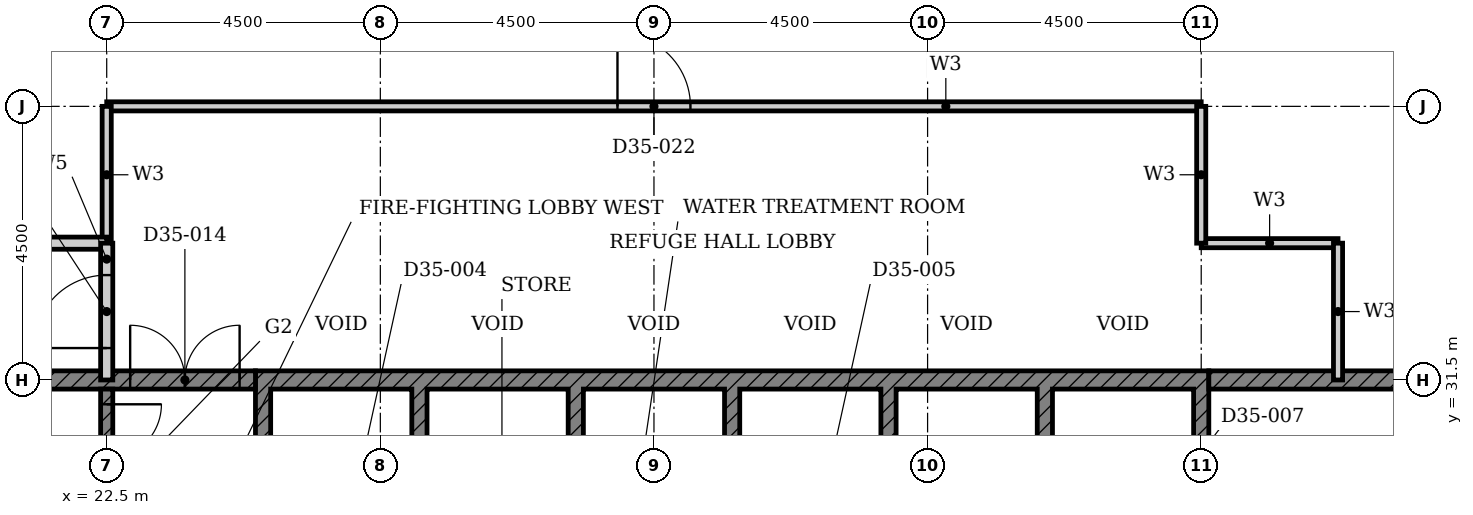
"""IFC4 building model, lengths in metres.
Left out: names, types, materials, properties, quantities, classifications, styles, units other than length and angle.
Written with IfcOpenShell. Run it as: python <this file> out.ifc"""

import sys

from ifc_helpers import new_model, si_unit, direction, frame, frame_2d, origin, place, context, subcontext, project, spatial, polyline, rectangle, outline, extrude, element, fill, save


model = new_model("IFC4")
c1 = context("Model", 3, precision=1e-05, world=origin(), true_north=direction((0.0, 1.0)))
c2 = subcontext(c1, "Body", "Model", "MODEL_VIEW")
j1 = project(units=[si_unit("LENGTHUNIT", "METRE"), si_unit("PLANEANGLEUNIT", "RADIAN")], contexts=[c1])
p1 = place(None, origin())
s1 = spatial("IfcSite", under=j1, at=p1, CompositionType="ELEMENT")
p2 = place(p1, origin())
s2 = spatial("IfcBuilding", under=s1, at=p2, CompositionType="ELEMENT")
p3 = place(p2, frame((0.0, 0.0, 140.4)))
s3 = spatial("IfcBuildingStorey", under=s2, at=p3, CompositionType="ELEMENT", Elevation=140.4)
p4 = place(p3, origin())
e1 = element("IfcWall", 1, at=p4, inside=s3, PredefinedType="SHEAR", context=c2, shape_type="SweptSolid", body=[
    extrude(outline(polyline([(24.947, 28.725), (25.197, 28.725), (25.197, 31.35), (27.518, 31.35), (27.518, 28.725), (27.768, 28.725), (27.768, 31.35), (30.089, 31.35), (30.089, 28.725), (30.339, 28.725), (30.339, 31.35), (32.661, 31.35), (32.661, 28.725), (32.911, 28.725), (32.911, 31.35), (35.232, 31.35), (35.232, 28.725), (35.482, 28.725), (35.482, 31.35), (37.803, 31.35), (37.803, 28.725), (38.053, 28.725), (38.053, 31.35), (40.375, 31.35), (40.375, 28.725), (40.625, 28.725), (40.625, 31.65), (24.947, 31.65), (24.947, 28.725)])), origin(), (0.0, 0.0, 1.0), 4.45),
])
p5 = place(p3, frame((18.15, 31.5, 0.0), z_axis=(0.0, 0.0, 1.0), x_axis=(1.0, 0.0, 0.0)))
e2 = element("IfcWall", 2, at=p5, inside=s3, PredefinedType="SHEAR", context=c2, shape_type="SweptSolid", body=[
    extrude(rectangle(XDim=6.797, YDim=0.3, at=frame_2d((3.398, 0.0))), origin(), (0.0, 0.0, 1.0), 4.45),
])
p6 = place(p5, frame((4.736, 0.0, 0.0)))
e3 = element("IfcOpeningElement", 3, at=p6, cuts=e2, PredefinedType="OPENING", context=c2, shape_type="SweptSolid", body=[
    extrude(rectangle(XDim=1.8, YDim=2.1, at=frame_2d((0.9, 1.05))), frame((0.0, 0.16, 0.0), z_axis=(0.0, -1.0, 0.0), x_axis=(1.0, 0.0, 0.0)), (0.0, 0.0, 1.0), 0.32),
])
p7 = place(p3, frame((40.625, 31.5, 0.0), z_axis=(0.0, 0.0, 1.0), x_axis=(1.0, 0.0, 0.0)))
e4 = element("IfcWall", 4, at=p7, inside=s3, PredefinedType="SHEAR", context=c2, shape_type="SweptSolid", body=[
    extrude(rectangle(XDim=4.225, YDim=0.3, at=frame_2d((2.113, 0.0))), origin(), (0.0, 0.0, 1.0), 4.45),
])
p8 = place(p3, frame((22.5, 31.35, 0.0), z_axis=(0.0, 0.0, 1.0), x_axis=(0.0, -1.0, 0.0)))
e5 = element("IfcWall", 5, at=p8, inside=s3, PredefinedType="SHEAR", context=c2, shape_type="SweptSolid", body=[
    extrude(rectangle(XDim=5.825, YDim=0.2, at=frame_2d((2.913, 0.0))), origin(), (0.0, 0.0, 1.0), 4.45),
])
p9 = place(p8, frame((0.25, 0.0, 0.0)))
e6 = element("IfcOpeningElement", 6, at=p9, cuts=e5, PredefinedType="OPENING", context=c2, shape_type="SweptSolid", body=[
    extrude(rectangle(XDim=1.8, YDim=2.1, at=frame_2d((0.9, 1.05))), frame((0.0, 0.11, 0.0), z_axis=(0.0, -1.0, 0.0), x_axis=(1.0, 0.0, 0.0)), (0.0, 0.0, 1.0), 0.22),
])
p10 = place(p3, frame((40.5, 33.75, 0.0), z_axis=(0.0, 0.0, 1.0), x_axis=(1.0, 0.0, 0.0)))
e7 = element("IfcWall", 7, at=p10, inside=s3, PredefinedType="PARTITIONING", context=c2, shape_type="SweptSolid", body=[
    extrude(rectangle(XDim=2.25, YDim=0.15, at=frame_2d((1.125, 0.0))), origin(), (0.0, 0.0, 1.0), 4.45),
])
p11 = place(p3, frame((22.5, 36.0, 0.0), z_axis=(0.0, 0.0, 1.0), x_axis=(1.0, 0.0, 0.0)))
e8 = element("IfcWall", 8, at=p11, inside=s3, PredefinedType="PARTITIONING", context=c2, shape_type="SweptSolid", body=[
    extrude(rectangle(XDim=18.0, YDim=0.15, at=frame_2d((9.0, 0.0))), origin(), (0.0, 0.0, 1.0), 4.45),
])
p12 = place(p11, frame((8.4, 0.0, 0.0)))
e9 = element("IfcOpeningElement", 9, at=p12, cuts=e8, PredefinedType="OPENING", context=c2, shape_type="SweptSolid", body=[
    extrude(rectangle(XDim=1.2, YDim=2.1, at=frame_2d((0.6, 1.05))), frame((0.0, 0.085, 0.0), z_axis=(0.0, -1.0, 0.0), x_axis=(1.0, 0.0, 0.0)), (0.0, 0.0, 1.0), 0.17),
])
for number, where, z_axis, x_axis in (
    (10, (22.5, 33.75, 0.0), (0.0, 0.0, 1.0), (0.0, 1.0, 0.0)),
    (11, (40.5, 33.75, 0.0), (0.0, 0.0, 1.0), (0.0, 1.0, 0.0)),
    (12, (42.75, 31.5, 0.0), (0.0, 0.0, 1.0), (0.0, 1.0, 0.0)),
):
    element("IfcWall", number, at=place(p3, frame(where, z_axis=z_axis, x_axis=x_axis)), inside=s3, PredefinedType="PARTITIONING", context=c2, shape_type="SweptSolid", body=[
        extrude(rectangle(XDim=2.25, YDim=0.15, at=frame_2d((1.125, 0.0))), origin(), (0.0, 0.0, 1.0), 4.45),
    ])
p13 = place(p3, frame((20.25, 33.75, 0.0), z_axis=(0.0, 0.0, 1.0), x_axis=(1.0, 0.0, 0.0)))
e13 = element("IfcWall", 13, at=p13, inside=s3, PredefinedType="PARTITIONING", context=c2, shape_type="SweptSolid", body=[
    extrude(rectangle(XDim=2.25, YDim=0.2, at=frame_2d((1.125, 0.0))), origin(), (0.0, 0.0, 1.0), 4.45),
])
p14 = place(p3, frame((22.5, 31.5, 0.0), z_axis=(0.0, 0.0, 1.0), x_axis=(0.0, 1.0, 0.0)))
e14 = element("IfcWall", 14, at=p14, inside=s3, PredefinedType="PARTITIONING", context=c2, shape_type="SweptSolid", body=[
    extrude(rectangle(XDim=2.25, YDim=0.2, at=frame_2d((1.125, 0.0))), origin(), (0.0, 0.0, 1.0), 4.45),
])
p15 = place(p14, frame((0.525, 0.0, 0.0)))
e15 = element("IfcOpeningElement", 15, at=p15, cuts=e14, PredefinedType="OPENING", context=c2, shape_type="SweptSolid", body=[
    extrude(rectangle(XDim=1.2, YDim=2.1, at=frame_2d((0.6, 1.05))), frame((0.0, 0.11, 0.0), z_axis=(0.0, -1.0, 0.0), x_axis=(1.0, 0.0, 0.0)), (0.0, 0.0, 1.0), 0.22),
])
p16 = place(p9, origin())
e16 = element("IfcDoor", 16, at=p16, inside=s3, OperationType="DOUBLE_DOOR_SINGLE_SWING", PredefinedType="DOOR", context=c2, shape_type="SweptSolid", body=[
    extrude(rectangle(XDim=1.8, YDim=2.1, at=frame_2d((0.9, 1.05))), frame((0.0, 0.025, 0.0), z_axis=(0.0, -1.0, 0.0), x_axis=(1.0, 0.0, 0.0)), (0.0, 0.0, 1.0), 0.05),
])
fill(e6, e16)
p17 = place(p6, origin())
e17 = element("IfcDoor", 17, at=p17, inside=s3, OperationType="DOUBLE_DOOR_SINGLE_SWING", PredefinedType="DOOR", context=c2, shape_type="SweptSolid", body=[
    extrude(rectangle(XDim=1.8, YDim=2.1, at=frame_2d((0.9, 1.05))), frame((0.0, 0.025, 0.0), z_axis=(0.0, -1.0, 0.0), x_axis=(1.0, 0.0, 0.0)), (0.0, 0.0, 1.0), 0.05),
])
fill(e3, e17)
p18 = place(p15, origin())
e18 = element("IfcDoor", 18, at=p18, inside=s3, OperationType="SINGLE_SWING_RIGHT", PredefinedType="DOOR", context=c2, shape_type="SweptSolid", body=[
    extrude(rectangle(XDim=1.2, YDim=2.1, at=frame_2d((0.6, 1.05))), frame((0.0, 0.025, 0.0), z_axis=(0.0, -1.0, 0.0), x_axis=(1.0, 0.0, 0.0)), (0.0, 0.0, 1.0), 0.05),
])
fill(e15, e18)
p19 = place(p12, origin())
e19 = element("IfcDoor", 19, at=p19, inside=s3, OperationType="SINGLE_SWING_RIGHT", PredefinedType="DOOR", context=c2, shape_type="SweptSolid", body=[
    extrude(rectangle(XDim=1.2, YDim=2.1, at=frame_2d((0.6, 1.05))), frame((0.0, 0.025, 0.0), z_axis=(0.0, -1.0, 0.0), x_axis=(1.0, 0.0, 0.0)), (0.0, 0.0, 1.0), 0.05),
])
fill(e9, e19)
save(model, sys.argv[1])
